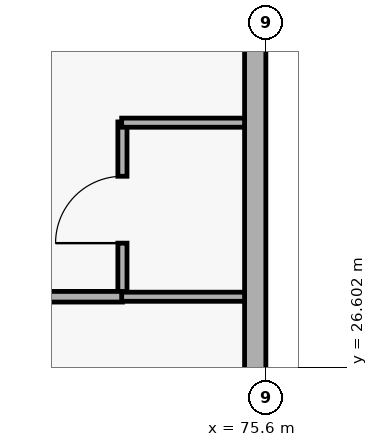
"""IFC4 building model, lengths in metres.
Left out: names, types, materials, properties, quantities, classifications, styles, units other than length and angle.
Written with IfcOpenShell. Run it as: python <this file> out.ifc"""

import sys

from ifc_helpers import new_model, si_unit, direction, frame, frame_2d, origin, place, context, subcontext, project, spatial, rectangle, extrude, element, fill, save


model = new_model("IFC4")
c1 = context("Model", 3, precision=1e-05, world=origin(), true_north=direction((0.0, 1.0)))
c2 = subcontext(c1, "Body", "Model", "MODEL_VIEW")
j1 = project(units=[si_unit("LENGTHUNIT", "METRE"), si_unit("PLANEANGLEUNIT", "RADIAN")], contexts=[c1])
p1 = place(None, origin())
s1 = spatial("IfcSite", under=j1, at=p1, CompositionType="ELEMENT")
p2 = place(p1, origin())
s2 = spatial("IfcBuilding", under=s1, at=p2, CompositionType="ELEMENT")
p3 = place(p2, frame((0.0, 0.0, 26.4)))
s3 = spatial("IfcBuildingStorey", under=s2, at=p3, CompositionType="ELEMENT", Elevation=26.4)
p4 = place(p3, frame((75.46, 34.0, 0.0), z_axis=(0.0, 0.0, 1.0), x_axis=(0.0, -1.0, 0.0)))
e1 = element("IfcWall", 1, at=p4, inside=s3, PredefinedType="SOLIDWALL", context=c2, shape_type="SweptSolid", body=[
    extrude(rectangle(XDim=25.2, YDim=0.28, at=frame_2d((12.6, 0.0))), origin(), (0.0, 0.0, 1.0), 3.32),
])
p5 = place(p4, frame((21.9, 0.0, 0.95)))
e2 = element("IfcOpeningElement", 2, at=p5, cuts=e1, PredefinedType="OPENING", context=c2, shape_type="SweptSolid", body=[
    extrude(rectangle(XDim=1.6, YDim=1.6, at=frame_2d((0.8, 0.8))), frame((0.0, 0.15, 0.0), z_axis=(0.0, -1.0, 0.0), x_axis=(1.0, 0.0, 0.0)), (0.0, 0.0, 1.0), 0.3),
])
p6 = place(p3, frame((73.713, 27.52, 0.0), z_axis=(0.0, 0.0, 1.0), x_axis=(0.0, 1.0, 0.0)))
e3 = element("IfcWall", 3, at=p6, inside=s3, PredefinedType="PARTITIONING", context=c2, shape_type="SweptSolid", body=[
    extrude(rectangle(XDim=2.31, YDim=0.12, at=frame_2d((1.155, 0.0))), origin(), (0.0, 0.0, 1.0), 2.48),
])
p7 = place(p6, frame((0.715, 0.0, 0.0)))
e4 = element("IfcOpeningElement", 4, at=p7, cuts=e3, PredefinedType="OPENING", context=c2, shape_type="SweptSolid", body=[
    extrude(rectangle(XDim=0.88, YDim=2.15, at=frame_2d((0.44, 1.075))), frame((0.0, 0.07, 0.0), z_axis=(0.0, -1.0, 0.0), x_axis=(1.0, 0.0, 0.0)), (0.0, 0.0, 1.0), 0.14),
])
p8 = place(p3, frame((71.201, 27.53, 0.0), z_axis=(0.0, 0.0, 1.0), x_axis=(1.0, 0.0, 0.0)))
e5 = element("IfcWall", 5, at=p8, inside=s3, PredefinedType="PARTITIONING", context=c2, shape_type="SweptSolid", body=[
    extrude(rectangle(XDim=2.512, YDim=0.14, at=frame_2d((1.256, 0.0))), origin(), (0.0, 0.0, 1.0), 2.48),
])
p9 = place(p8, frame((0.549, 0.0, 0.0)))
e6 = element("IfcOpeningElement", 6, at=p9, cuts=e5, PredefinedType="OPENING", context=c2, shape_type="SweptSolid", body=[
    extrude(rectangle(XDim=0.96, YDim=2.25, at=frame_2d((0.48, 1.125))), frame((0.0, 0.08, 0.0), z_axis=(0.0, -1.0, 0.0), x_axis=(1.0, 0.0, 0.0)), (0.0, 0.0, 1.0), 0.16),
])
for number, where, z_axis, x_axis in (
    (7, (73.703, 27.53, 0.0), (0.0, 0.0, 1.0), (1.0, 0.0, 0.0)),
    (8, (73.703, 29.82, 0.0), (0.0, 0.0, 1.0), (1.0, 0.0, 0.0)),
):
    element("IfcWall", number, at=place(p3, frame(where, z_axis=z_axis, x_axis=x_axis)), inside=s3, PredefinedType="PARTITIONING", context=c2, shape_type="SweptSolid", body=[
        extrude(rectangle(XDim=1.617, YDim=0.12, at=frame_2d((0.809, 0.0))), origin(), (0.0, 0.0, 1.0), 2.48),
    ])
p10 = place(p7, origin())
e9 = element("IfcDoor", 9, at=p10, inside=s3, OperationType="SINGLE_SWING_LEFT", PredefinedType="DOOR", context=c2, shape_type="SweptSolid", body=[
    extrude(rectangle(XDim=0.88, YDim=2.15, at=frame_2d((0.44, 1.075))), frame((0.0, 0.025, 0.0), z_axis=(0.0, -1.0, 0.0), x_axis=(1.0, 0.0, 0.0)), (0.0, 0.0, 1.0), 0.05),
])
fill(e4, e9)
save(model, sys.argv[1])
